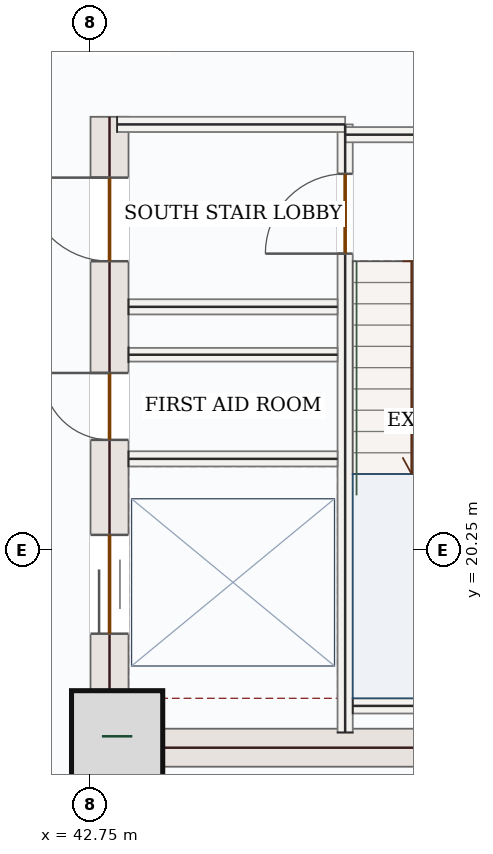
"""IFC4 building model, lengths in metres.
Left out: names, types, materials, properties, quantities, classifications, styles, units other than length and angle.
Written with IfcOpenShell. Run it as: python <this file> out.ifc"""

import sys

from ifc_helpers import new_model, si_unit, direction, frame, frame_2d, origin, origin_2d, place, context, subcontext, project, spatial, rectangle, extrude, source, transform, mapped, element, fill, save


model = new_model("IFC4")
c1 = context("Model", 3, precision=1e-05, world=origin(), true_north=direction((0.0, 1.0)))
c2 = subcontext(c1, "Body", "Model", "MODEL_VIEW")
j1 = project(units=[si_unit("LENGTHUNIT", "METRE"), si_unit("PLANEANGLEUNIT", "RADIAN")], contexts=[c1])
p1 = place(None, origin())
s1 = spatial("IfcSite", under=j1, at=p1, CompositionType="ELEMENT")
p2 = place(p1, origin())
s2 = spatial("IfcBuilding", under=s1, at=p2, CompositionType="ELEMENT")
p3 = place(p2, frame((0.0, 0.0, 178.5)))
s3 = spatial("IfcBuildingStorey", under=s2, at=p3, CompositionType="ELEMENT", Elevation=178.5)
p4 = place(p3, frame((43.0, 17.4, 0.0), z_axis=(0.0, 0.0, 1.0), x_axis=(0.0, 1.0, 0.0)))
e1 = element("IfcWall", 1, at=p4, inside=s3, PredefinedType="SHEAR", context=c2, shape_type="SweptSolid", body=[
    extrude(rectangle(XDim=8.55, YDim=0.5, at=frame_2d((4.275, 0.0))), origin(), (0.0, 0.0, 1.0), 3.62),
])
p5 = place(p4, frame((6.65, 0.0, 0.0)))
e2 = element("IfcOpeningElement", 2, at=p5, cuts=e1, PredefinedType="OPENING", context=c2, shape_type="SweptSolid", body=[
    extrude(rectangle(XDim=1.1, YDim=2.2, at=frame_2d((0.55, 1.1))), frame((0.0, 0.26, 0.0), z_axis=(0.0, -1.0, 0.0), x_axis=(1.0, 0.0, 0.0)), (0.0, 0.0, 1.0), 0.52),
])
p6 = place(p4, frame((1.75, 0.0, 0.0)))
e3 = element("IfcOpeningElement", 3, at=p6, cuts=e1, PredefinedType="OPENING", context=c2, shape_type="SweptSolid", body=[
    extrude(rectangle(XDim=1.3, YDim=2.2, at=frame_2d((0.65, 1.1))), frame((0.0, 0.26, 0.0), z_axis=(0.0, -1.0, 0.0), x_axis=(1.0, 0.0, 0.0)), (0.0, 0.0, 1.0), 0.52),
])
p7 = place(p4, frame((4.3, 0.0, 0.0)))
e4 = element("IfcOpeningElement", 4, at=p7, cuts=e1, PredefinedType="OPENING", context=c2, shape_type="SweptSolid", body=[
    extrude(rectangle(XDim=0.88, YDim=2.1, at=frame_2d((0.44, 1.05))), frame((0.0, 0.26, 0.0), z_axis=(0.0, -1.0, 0.0), x_axis=(1.0, 0.0, 0.0)), (0.0, 0.0, 1.0), 0.52),
])
m1 = source(origin(), c2, "Body", "SweptSolid", [
    extrude(rectangle(XDim=7.0, YDim=0.5, at=frame_2d((3.5, 0.0))), origin(), (0.0, 0.0, 1.0), 3.62),
])
p8 = place(p3, frame((43.25, 17.65, 0.0), z_axis=(0.0, 0.0, 1.0), x_axis=(1.0, 0.0, 0.0)))
e5 = element("IfcWall", 5, at=p8, inside=s3, PredefinedType="SHEAR", context=c2, shape_type="MappedRepresentation", body=[
    mapped(m1, transform((0.0, 0.0, 0.0), x_axis=(1.0, 0.0, 0.0), y_axis=(0.0, 1.0, 0.0), z_axis=(0.0, 0.0, 1.0), scale=1.0)),
])
m2 = source(origin(), c2, "Body", "SweptSolid", [
    extrude(rectangle(XDim=1.2, YDim=1.2, at=origin_2d()), origin(), (0.0, 0.0, 1.0), 3.9),
])
p9 = place(p3, frame((43.1, 17.8, 0.0), z_axis=(0.0, 0.0, 1.0), x_axis=(1.0, 0.0, 0.0)))
e6 = element("IfcColumn", 6, at=p9, inside=s3, PredefinedType="COLUMN", context=c2, shape_type="MappedRepresentation", body=[
    mapped(m2, transform((0.0, 0.0, 0.0), x_axis=(1.0, 0.0, 0.0), y_axis=(0.0, 1.0, 0.0), z_axis=(0.0, 0.0, 1.0), scale=1.0)),
])
p10 = place(p3, frame((46.1, 17.85, 0.0), z_axis=(0.0, 0.0, 1.0), x_axis=(0.0, 1.0, 0.0)))
e7 = element("IfcWall", 7, at=p10, inside=s3, PredefinedType="SOLIDWALL", context=c2, shape_type="SweptSolid", body=[
    extrude(rectangle(XDim=8.0, YDim=0.2, at=frame_2d((4.0, 0.0))), origin(), (0.0, 0.0, 1.0), 3.62),
])
p11 = place(p10, frame((6.3, 0.0, 0.0)))
e8 = element("IfcOpeningElement", 8, at=p11, cuts=e7, PredefinedType="OPENING", context=c2, shape_type="SweptSolid", body=[
    extrude(rectangle(XDim=1.05, YDim=2.15, at=frame_2d((0.525, 1.075))), frame((0.0, 0.11, 0.0), z_axis=(0.0, -1.0, 0.0), x_axis=(1.0, 0.0, 0.0)), (0.0, 0.0, 1.0), 0.22),
])
m3 = source(origin(), c2, "Body", "SweptSolid", [
    extrude(rectangle(XDim=3.0, YDim=0.2, at=frame_2d((1.5, 0.0))), origin(), (0.0, 0.0, 1.0), 3.62),
])
p12 = place(p3, frame((43.1, 25.85, 0.0), z_axis=(0.0, 0.0, 1.0), x_axis=(1.0, 0.0, 0.0)))
e9 = element("IfcWall", 9, at=p12, inside=s3, PredefinedType="SOLIDWALL", context=c2, shape_type="MappedRepresentation", body=[
    mapped(m3, transform((0.0, 0.0, 0.0), x_axis=(1.0, 0.0, 0.0), y_axis=(0.0, 1.0, 0.0), z_axis=(0.0, 0.0, 1.0), scale=1.0)),
])
m4 = source(origin(), c2, "Body", "SweptSolid", [
    extrude(rectangle(XDim=4.25, YDim=0.2, at=frame_2d((2.125, 0.0))), origin(), (0.0, 0.0, 1.0), 3.62),
])
p13 = place(p3, frame((46.1, 25.715, 0.0), z_axis=(0.0, 0.0, 1.0), x_axis=(1.0, 0.0, 0.0)))
e10 = element("IfcWall", 10, at=p13, inside=s3, PredefinedType="SOLIDWALL", context=c2, shape_type="MappedRepresentation", body=[
    mapped(m4, transform((0.0, 0.0, 0.0), x_axis=(1.0, 0.0, 0.0), y_axis=(0.0, 1.0, 0.0), z_axis=(0.0, 0.0, 1.0), scale=1.0)),
])
m5 = source(origin(), c2, "Body", "SweptSolid", [
    extrude(rectangle(XDim=3.25, YDim=0.2, at=frame_2d((1.625, 0.0))), origin(), (0.0, 0.0, 1.0), 3.62),
])
p14 = place(p3, frame((46.2, 18.2, 0.0), z_axis=(0.0, 0.0, 1.0), x_axis=(1.0, 0.0, 0.0)))
e11 = element("IfcWall", 11, at=p14, inside=s3, PredefinedType="SOLIDWALL", context=c2, shape_type="MappedRepresentation", body=[
    mapped(m5, transform((0.0, 0.0, 0.0), x_axis=(1.0, 0.0, 0.0), y_axis=(0.0, 1.0, 0.0), z_axis=(0.0, 0.0, 1.0), scale=1.0)),
])
m6 = source(origin(), c2, "Body", "SweptSolid", [
    extrude(rectangle(XDim=2.75, YDim=0.2, at=frame_2d((1.375, 0.0))), origin(), (0.0, 0.0, 1.0), 3.62),
])
for number, where, z_axis, x_axis in (
    (12, (43.25, 23.45, 0.0), (0.0, 0.0, 1.0), (1.0, 0.0, 0.0)),
    (13, (43.25, 21.45, 0.0), (0.0, 0.0, 1.0), (1.0, 0.0, 0.0)),
):
    element("IfcWall", number, at=place(p3, frame(where, z_axis=z_axis, x_axis=x_axis)), inside=s3, PredefinedType="SOLIDWALL", context=c2, shape_type="MappedRepresentation", body=[
        mapped(m6, transform((0.0, 0.0, 0.0), x_axis=(1.0, 0.0, 0.0), y_axis=(0.0, 1.0, 0.0), z_axis=(0.0, 0.0, 1.0), scale=1.0)),
    ])
m7 = source(origin(), c2, "Body", "SweptSolid", [
    extrude(rectangle(XDim=2.75, YDim=0.18, at=frame_2d((1.375, 0.0))), origin(), (0.0, 0.0, 1.0), 3.62),
])
p15 = place(p3, frame((43.25, 22.82, 0.0), z_axis=(0.0, 0.0, 1.0), x_axis=(1.0, 0.0, 0.0)))
e14 = element("IfcWall", 14, at=p15, inside=s3, PredefinedType="PARTITIONING", context=c2, shape_type="MappedRepresentation", body=[
    mapped(m7, transform((0.0, 0.0, 0.0), x_axis=(1.0, 0.0, 0.0), y_axis=(0.0, 1.0, 0.0), z_axis=(0.0, 0.0, 1.0), scale=1.0)),
])
m8 = source(origin(), c2, "Body", "SweptSolid", [
    extrude(rectangle(XDim=1.05, YDim=2.15, at=frame_2d((0.525, 1.075))), frame((0.0, 0.025, 0.0), z_axis=(0.0, -1.0, 0.0), x_axis=(1.0, 0.0, 0.0)), (0.0, 0.0, 1.0), 0.05),
])
p16 = place(p11, origin())
e15 = element("IfcDoor", 15, at=p16, inside=s3, OperationType="SINGLE_SWING_LEFT", PredefinedType="DOOR", context=c2, shape_type="MappedRepresentation", body=[
    mapped(m8, transform((0.0, 0.0, 0.0), x_axis=(1.0, 0.0, 0.0), y_axis=(0.0, 1.0, 0.0), z_axis=(0.0, 0.0, 1.0), scale=1.0)),
])
fill(e8, e15)
m9 = source(origin(), c2, "Body", "SweptSolid", [
    extrude(rectangle(XDim=1.1, YDim=2.2, at=frame_2d((0.55, 1.1))), frame((0.0, 0.025, 0.0), z_axis=(0.0, -1.0, 0.0), x_axis=(1.0, 0.0, 0.0)), (0.0, 0.0, 1.0), 0.05),
])
p17 = place(p5, origin())
e16 = element("IfcDoor", 16, at=p17, inside=s3, OperationType="SINGLE_SWING_RIGHT", PredefinedType="DOOR", context=c2, shape_type="MappedRepresentation", body=[
    mapped(m9, transform((0.0, 0.0, 0.0), x_axis=(1.0, 0.0, 0.0), y_axis=(0.0, 1.0, 0.0), z_axis=(0.0, 0.0, 1.0), scale=1.0)),
])
fill(e2, e16)
m10 = source(origin(), c2, "Body", "SweptSolid", [
    extrude(rectangle(XDim=1.3, YDim=2.2, at=frame_2d((0.65, 1.1))), frame((0.0, 0.025, 0.0), z_axis=(0.0, -1.0, 0.0), x_axis=(1.0, 0.0, 0.0)), (0.0, 0.0, 1.0), 0.05),
])
p18 = place(p6, origin())
e17 = element("IfcDoor", 17, at=p18, inside=s3, OperationType="DOUBLE_DOOR_SLIDING", PredefinedType="DOOR", context=c2, shape_type="MappedRepresentation", body=[
    mapped(m10, transform((0.0, 0.0, 0.0), x_axis=(1.0, 0.0, 0.0), y_axis=(0.0, 1.0, 0.0), z_axis=(0.0, 0.0, 1.0), scale=1.0)),
])
fill(e3, e17)
m11 = source(origin(), c2, "Body", "SweptSolid", [
    extrude(rectangle(XDim=0.88, YDim=2.1, at=frame_2d((0.44, 1.05))), frame((0.0, 0.025, 0.0), z_axis=(0.0, -1.0, 0.0), x_axis=(1.0, 0.0, 0.0)), (0.0, 0.0, 1.0), 0.05),
])
p19 = place(p7, origin())
e18 = element("IfcDoor", 18, at=p19, inside=s3, OperationType="SINGLE_SWING_RIGHT", PredefinedType="DOOR", context=c2, shape_type="MappedRepresentation", body=[
    mapped(m11, transform((0.0, 0.0, 0.0), x_axis=(1.0, 0.0, 0.0), y_axis=(0.0, 1.0, 0.0), z_axis=(0.0, 0.0, 1.0), scale=1.0)),
])
fill(e4, e18)
save(model, sys.argv[1])
